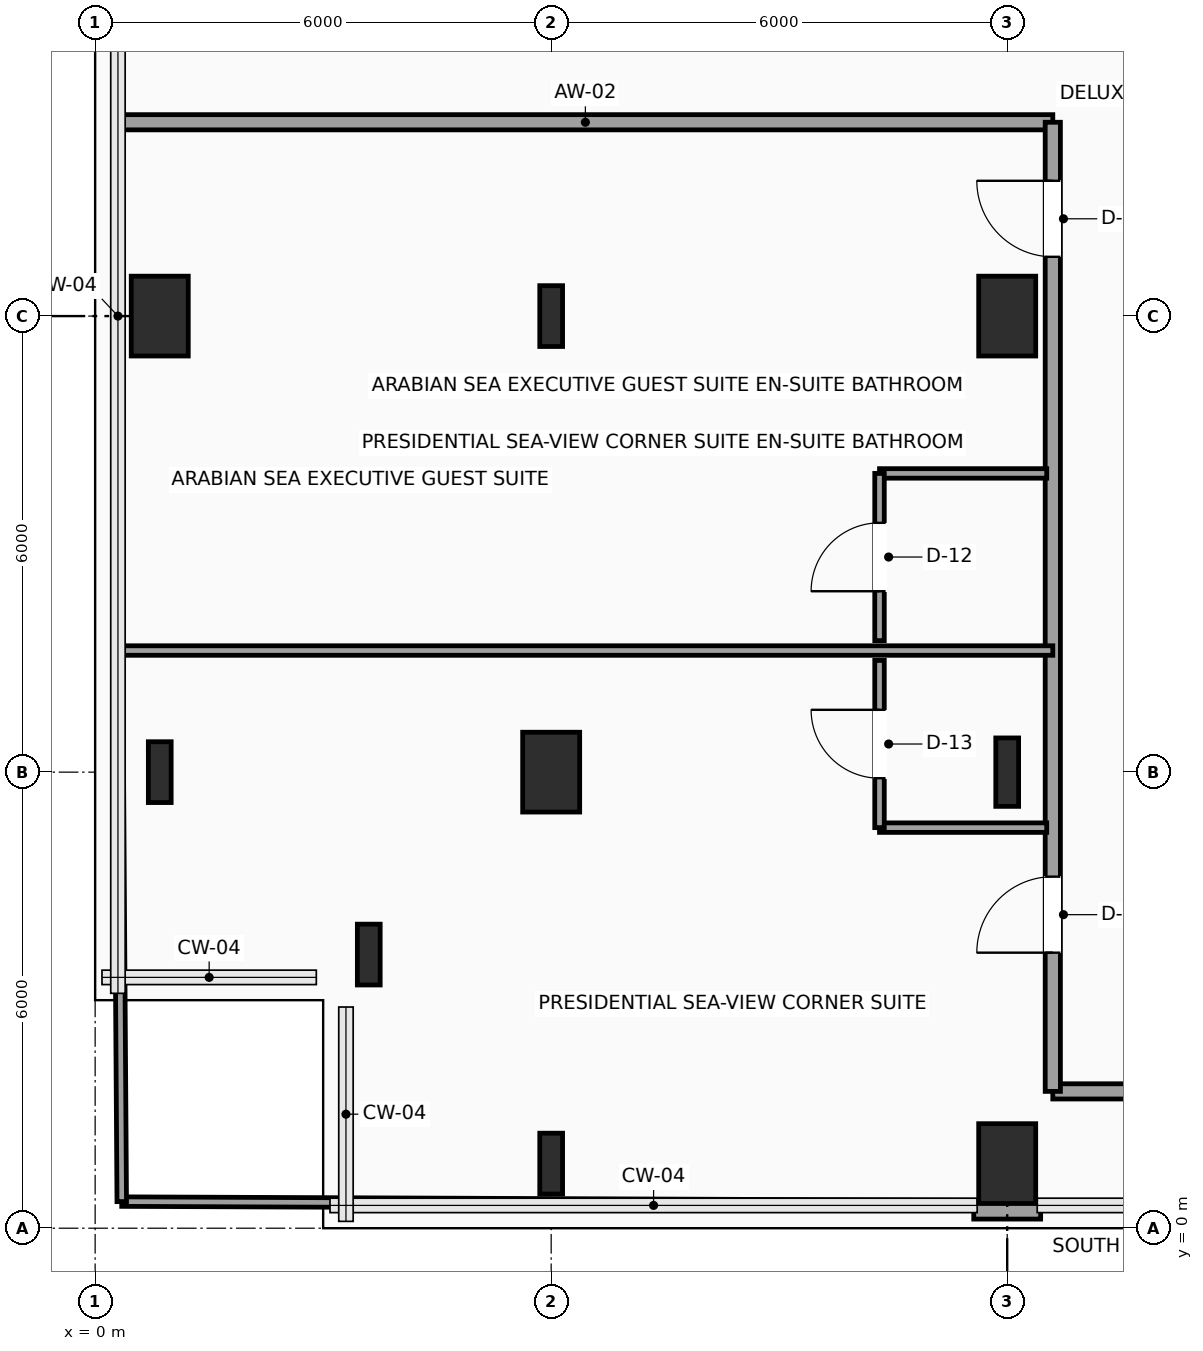
"""IFC4 building model, lengths in metres.
Left out: names, types, materials, properties, quantities, classifications, styles, units other than length and angle.
Written with IfcOpenShell. Run it as: python <this file> out.ifc"""

import sys

from ifc_helpers import new_model, si_unit, direction, frame, frame_2d, origin, origin_2d, place, context, subcontext, project, spatial, rectangle, i_section, extrude, element, fill, save


model = new_model("IFC4")
c1 = context("Model", 3, precision=1e-05, world=origin(), true_north=direction((0.0, 1.0)))
c2 = subcontext(c1, "Body", "Model", "MODEL_VIEW")
j1 = project(units=[si_unit("LENGTHUNIT", "METRE"), si_unit("PLANEANGLEUNIT", "RADIAN")], contexts=[c1])
p1 = place(None, origin())
s1 = spatial("IfcSite", under=j1, at=p1, CompositionType="ELEMENT")
p2 = place(p1, origin())
s2 = spatial("IfcBuilding", under=s1, at=p2, CompositionType="ELEMENT")
p3 = place(p2, frame((0.0, 0.0, 216.15)))
s3 = spatial("IfcBuildingStorey", under=s2, at=p3, CompositionType="ELEMENT", Elevation=216.15)
for number, where, z_axis, x_axis in (
    (1, (3.6, 3.6, 0.0), (0.0, 0.0, 1.0), (1.0, 0.0, 0.0)),
    (2, (0.85, 6.0, 0.0), (0.0, 0.0, 1.0), (1.0, 0.0, 0.0)),
):
    element("IfcColumn", number, at=place(p3, frame(where, z_axis=z_axis, x_axis=x_axis)), inside=s3, PredefinedType="COLUMN", context=c2, shape_type="SweptSolid", body=[
        extrude(i_section(OverallWidth=0.3, OverallDepth=0.8, WebThickness=0.018, FlangeThickness=0.033, FilletRadius=0.03, at=origin_2d()), origin(), (0.0, 0.0, 1.0), 3.75),
    ])
p4 = place(p3, frame((0.85, 12.0, 0.0), z_axis=(0.0, 0.0, 1.0), x_axis=(1.0, 0.0, 0.0)))
e3 = element("IfcColumn", 3, at=p4, inside=s3, PredefinedType="COLUMN", context=c2, shape_type="SweptSolid", body=[
    extrude(rectangle(XDim=0.75, YDim=1.05, at=origin_2d()), origin(), (0.0, 0.0, 1.0), 3.75),
])
p5 = place(p3, frame((6.0, 0.85, 0.0), z_axis=(0.0, 0.0, 1.0), x_axis=(1.0, 0.0, 0.0)))
e4 = element("IfcColumn", 4, at=p5, inside=s3, PredefinedType="COLUMN", context=c2, shape_type="SweptSolid", body=[
    extrude(i_section(OverallWidth=0.3, OverallDepth=0.8, WebThickness=0.018, FlangeThickness=0.033, FilletRadius=0.03, at=origin_2d()), origin(), (0.0, 0.0, 1.0), 3.75),
])
p6 = place(p3, frame((6.0, 6.0, 0.0), z_axis=(0.0, 0.0, 1.0), x_axis=(1.0, 0.0, 0.0)))
e5 = element("IfcColumn", 5, at=p6, inside=s3, PredefinedType="COLUMN", context=c2, shape_type="SweptSolid", body=[
    extrude(rectangle(XDim=0.75, YDim=1.05, at=origin_2d()), origin(), (0.0, 0.0, 1.0), 3.75),
])
p7 = place(p3, frame((6.0, 12.0, 0.0), z_axis=(0.0, 0.0, 1.0), x_axis=(1.0, 0.0, 0.0)))
e6 = element("IfcColumn", 6, at=p7, inside=s3, PredefinedType="COLUMN", context=c2, shape_type="SweptSolid", body=[
    extrude(i_section(OverallWidth=0.3, OverallDepth=0.8, WebThickness=0.018, FlangeThickness=0.033, FilletRadius=0.03, at=origin_2d()), origin(), (0.0, 0.0, 1.0), 3.75),
])
p8 = place(p3, frame((12.0, 0.85, 0.0), z_axis=(0.0, 0.0, 1.0), x_axis=(1.0, 0.0, 0.0)))
e7 = element("IfcColumn", 7, at=p8, inside=s3, PredefinedType="COLUMN", context=c2, shape_type="SweptSolid", body=[
    extrude(rectangle(XDim=0.75, YDim=1.05, at=origin_2d()), origin(), (0.0, 0.0, 1.0), 3.75),
])
p9 = place(p3, frame((12.0, 6.0, 0.0), z_axis=(0.0, 0.0, 1.0), x_axis=(1.0, 0.0, 0.0)))
e8 = element("IfcColumn", 8, at=p9, inside=s3, PredefinedType="COLUMN", context=c2, shape_type="SweptSolid", body=[
    extrude(i_section(OverallWidth=0.3, OverallDepth=0.9, WebThickness=0.019, FlangeThickness=0.035, FilletRadius=0.03, at=origin_2d()), origin(), (0.0, 0.0, 1.0), 3.75),
])
p10 = place(p3, frame((12.0, 12.0, 0.0), z_axis=(0.0, 0.0, 1.0), x_axis=(1.0, 0.0, 0.0)))
e9 = element("IfcColumn", 9, at=p10, inside=s3, PredefinedType="COLUMN", context=c2, shape_type="SweptSolid", body=[
    extrude(rectangle(XDim=0.75, YDim=1.05, at=origin_2d()), origin(), (0.0, 0.0, 1.0), 3.75),
])
p11 = place(p3, frame((12.44, 0.24, 0.0), z_axis=(0.0, 0.0, 1.0), x_axis=(-1.0, 0.0, 0.0)))
e10 = element("IfcWall", 10, at=p11, inside=s3, PredefinedType="SOLIDWALL", context=c2, shape_type="SweptSolid", body=[
    extrude(rectangle(XDim=0.88, YDim=0.24, at=frame_2d((0.44, 0.0))), origin(), (0.0, 0.0, 1.0), 3.54),
])
p12 = place(p3, frame((12.6, 14.55, 0.0), z_axis=(0.0, 0.0, 1.0), x_axis=(-1.0, 0.0, 0.0)))
e11 = element("IfcWall", 11, at=p12, inside=s3, PredefinedType="PARTITIONING", context=c2, shape_type="SweptSolid", body=[
    extrude(rectangle(XDim=12.3, YDim=0.2, at=frame_2d((6.15, 0.0))), origin(), (0.0, 0.0, 1.0), 3.54),
])
p13 = place(p3, frame((14.95, 1.8, 0.0), z_axis=(0.0, 0.0, 1.0), x_axis=(-1.0, 0.0, 0.0)))
e12 = element("IfcWall", 12, at=p13, inside=s3, PredefinedType="PARTITIONING", context=c2, shape_type="SweptSolid", body=[
    extrude(rectangle(XDim=2.35, YDim=0.2, at=frame_2d((1.175, 0.0))), origin(), (0.0, 0.0, 1.0), 3.54),
])
p14 = place(p3, frame((12.6, 1.8, 0.0), z_axis=(0.0, 0.0, 1.0), x_axis=(0.0, 1.0, 0.0)))
e13 = element("IfcWall", 13, at=p14, inside=s3, PredefinedType="PARTITIONING", context=c2, shape_type="SweptSolid", body=[
    extrude(rectangle(XDim=12.75, YDim=0.2, at=frame_2d((6.375, 0.0))), origin(), (0.0, 0.0, 1.0), 3.54),
])
p15 = place(p14, frame((1.825, 0.0, 0.0)))
e14 = element("IfcOpeningElement", 14, at=p15, cuts=e13, PredefinedType="OPENING", context=c2, shape_type="SweptSolid", body=[
    extrude(rectangle(XDim=1.0, YDim=2.2, at=frame_2d((0.5, 1.1))), frame((0.0, 0.11, 0.0), z_axis=(0.0, -1.0, 0.0), x_axis=(1.0, 0.0, 0.0)), (0.0, 0.0, 1.0), 0.22),
])
p16 = place(p14, frame((10.98, 0.0, 0.0)))
e15 = element("IfcOpeningElement", 15, at=p16, cuts=e13, PredefinedType="OPENING", context=c2, shape_type="SweptSolid", body=[
    extrude(rectangle(XDim=1.0, YDim=2.2, at=frame_2d((0.5, 1.1))), frame((0.0, 0.11, 0.0), z_axis=(0.0, -1.0, 0.0), x_axis=(1.0, 0.0, 0.0)), (0.0, 0.0, 1.0), 0.22),
])
p17 = place(p3, frame((0.35, 0.35, 0.0), z_axis=(0.0, 0.0, 1.0), x_axis=(0.999991617913, -0.004094398993, 0.0)))
e16 = element("IfcWall", 16, at=p17, inside=s3, PredefinedType="PARTITIONING", context=c2, shape_type="SweptSolid", body=[
    extrude(rectangle(XDim=11.21, YDim=0.125, at=frame_2d((5.605, 0.0))), origin(), (0.0, 0.0, 1.0), 3.54),
])
p18 = place(p3, frame((0.3, 7.6, 0.0), z_axis=(0.0, 0.0, 1.0), x_axis=(1.0, 0.0, 0.0)))
e17 = element("IfcWall", 17, at=p18, inside=s3, PredefinedType="PARTITIONING", context=c2, shape_type="SweptSolid", body=[
    extrude(rectangle(XDim=12.3, YDim=0.125, at=frame_2d((6.15, 0.0))), origin(), (0.0, 0.0, 1.0), 3.54),
])
p19 = place(p3, frame((0.35, 0.35, 0.0), z_axis=(0.0, 0.0, 1.0), x_axis=(-0.006903122154, 0.999976173168, 0.0)))
e18 = element("IfcWall", 18, at=p19, inside=s3, PredefinedType="PARTITIONING", context=c2, shape_type="SweptSolid", body=[
    extrude(rectangle(XDim=7.25, YDim=0.125, at=frame_2d((3.625, 0.0))), origin(), (0.0, 0.0, 1.0), 3.54),
])
p20 = place(p3, frame((10.32, 5.27, 0.0), z_axis=(0.0, 0.0, 1.0), x_axis=(1.0, 0.0, 0.0)))
e19 = element("IfcWall", 19, at=p20, inside=s3, PredefinedType="PARTITIONING", context=c2, shape_type="SweptSolid", body=[
    extrude(rectangle(XDim=2.2, YDim=0.125, at=frame_2d((1.1, 0.0))), origin(), (0.0, 0.0, 1.0), 3.54),
])
p21 = place(p3, frame((10.32, 5.27, 0.0), z_axis=(0.0, 0.0, 1.0), x_axis=(0.0, 1.0, 0.0)))
e20 = element("IfcWall", 20, at=p21, inside=s3, PredefinedType="PARTITIONING", context=c2, shape_type="SweptSolid", body=[
    extrude(rectangle(XDim=2.2, YDim=0.125, at=frame_2d((1.1, 0.0))), origin(), (0.0, 0.0, 1.0), 3.54),
])
p22 = place(p21, frame((0.65, 0.0, 0.0)))
e21 = element("IfcOpeningElement", 21, at=p22, cuts=e20, PredefinedType="OPENING", context=c2, shape_type="SweptSolid", body=[
    extrude(rectangle(XDim=0.9, YDim=2.1, at=frame_2d((0.45, 1.05))), frame((0.0, 0.073, 0.0), z_axis=(0.0, -1.0, 0.0), x_axis=(1.0, 0.0, 0.0)), (0.0, 0.0, 1.0), 0.145),
])
p23 = place(p3, frame((10.32, 9.93, 0.0), z_axis=(0.0, 0.0, 1.0), x_axis=(1.0, 0.0, 0.0)))
e22 = element("IfcWall", 22, at=p23, inside=s3, PredefinedType="PARTITIONING", context=c2, shape_type="SweptSolid", body=[
    extrude(rectangle(XDim=2.2, YDim=0.125, at=frame_2d((1.1, 0.0))), origin(), (0.0, 0.0, 1.0), 3.54),
])
p24 = place(p3, frame((10.32, 7.73, 0.0), z_axis=(0.0, 0.0, 1.0), x_axis=(0.0, 1.0, 0.0)))
e23 = element("IfcWall", 23, at=p24, inside=s3, PredefinedType="PARTITIONING", context=c2, shape_type="SweptSolid", body=[
    extrude(rectangle(XDim=2.2, YDim=0.125, at=frame_2d((1.1, 0.0))), origin(), (0.0, 0.0, 1.0), 3.54),
])
p25 = place(p24, frame((0.65, 0.0, 0.0)))
e24 = element("IfcOpeningElement", 24, at=p25, cuts=e23, PredefinedType="OPENING", context=c2, shape_type="SweptSolid", body=[
    extrude(rectangle(XDim=0.9, YDim=2.1, at=frame_2d((0.45, 1.05))), frame((0.0, 0.073, 0.0), z_axis=(0.0, -1.0, 0.0), x_axis=(1.0, 0.0, 0.0)), (0.0, 0.0, 1.0), 0.145),
])
p26 = place(p15, origin())
e25 = element("IfcDoor", 25, at=p26, inside=s3, OperationType="SINGLE_SWING_LEFT", PredefinedType="DOOR", context=c2, shape_type="SweptSolid", body=[
    extrude(rectangle(XDim=1.0, YDim=2.2, at=frame_2d((0.5, 1.1))), frame((0.0, 0.025, 0.0), z_axis=(0.0, -1.0, 0.0), x_axis=(1.0, 0.0, 0.0)), (0.0, 0.0, 1.0), 0.05),
])
fill(e14, e25)
p27 = place(p16, origin())
e26 = element("IfcDoor", 26, at=p27, inside=s3, OperationType="SINGLE_SWING_RIGHT", PredefinedType="DOOR", context=c2, shape_type="SweptSolid", body=[
    extrude(rectangle(XDim=1.0, YDim=2.2, at=frame_2d((0.5, 1.1))), frame((0.0, 0.025, 0.0), z_axis=(0.0, -1.0, 0.0), x_axis=(1.0, 0.0, 0.0)), (0.0, 0.0, 1.0), 0.05),
])
fill(e15, e26)
p28 = place(p22, origin())
e27 = element("IfcDoor", 27, at=p28, inside=s3, OperationType="SINGLE_SWING_RIGHT", PredefinedType="DOOR", context=c2, shape_type="SweptSolid", body=[
    extrude(rectangle(XDim=0.9, YDim=2.1, at=frame_2d((0.45, 1.05))), frame((0.0, 0.025, 0.0), z_axis=(0.0, -1.0, 0.0), x_axis=(1.0, 0.0, 0.0)), (0.0, 0.0, 1.0), 0.05),
])
fill(e21, e27)
p29 = place(p25, origin())
e28 = element("IfcDoor", 28, at=p29, inside=s3, OperationType="SINGLE_SWING_LEFT", PredefinedType="DOOR", context=c2, shape_type="SweptSolid", body=[
    extrude(rectangle(XDim=0.9, YDim=2.1, at=frame_2d((0.45, 1.05))), frame((0.0, 0.025, 0.0), z_axis=(0.0, -1.0, 0.0), x_axis=(1.0, 0.0, 0.0)), (0.0, 0.0, 1.0), 0.05),
])
fill(e24, e28)
save(model, sys.argv[1])
